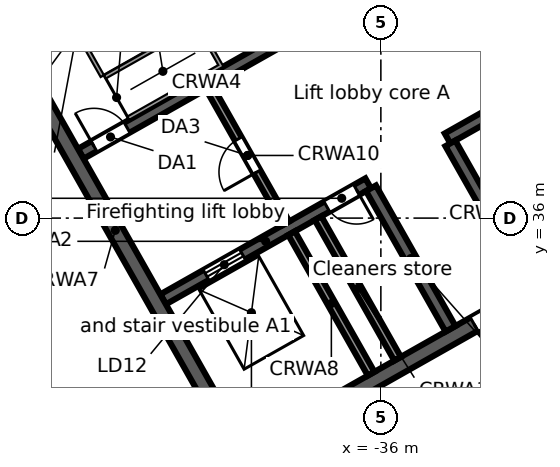
"""IFC4 building model, lengths in metres.
Left out: names, types, materials, properties, quantities, classifications, styles, units other than length and angle.
Written with IfcOpenShell. Run it as: python <this file> out.ifc"""

import sys

from ifc_helpers import new_model, si_unit, direction, frame, frame_2d, origin, place, context, subcontext, project, spatial, rectangle, extrude, element, fill, save


model = new_model("IFC4")
c1 = context("Model", 3, precision=1e-05, world=origin(), true_north=direction((0.0, 1.0)))
c2 = subcontext(c1, "Body", "Model", "MODEL_VIEW")
j1 = project(units=[si_unit("LENGTHUNIT", "METRE"), si_unit("PLANEANGLEUNIT", "RADIAN")], contexts=[c1])
p1 = place(None, origin())
s1 = spatial("IfcSite", under=j1, at=p1, CompositionType="ELEMENT")
p2 = place(p1, origin())
s2 = spatial("IfcBuilding", under=s1, at=p2, CompositionType="ELEMENT")
p3 = place(p2, frame((0.0, 0.0, 266.5)))
s3 = spatial("IfcBuildingStorey", under=s2, at=p3, CompositionType="ELEMENT", Elevation=266.5)
p4 = place(p3, frame((-58.732, 38.771, 0.0), z_axis=(0.0, 0.0, 1.0), x_axis=(0.870355615581, 0.492423702137, 0.0)))
e1 = element("IfcWall", 1, at=p4, inside=s3, PredefinedType="STANDARD", context=c2, shape_type="SweptSolid", body=[
    extrude(rectangle(XDim=64.052, YDim=0.25, at=frame_2d((32.026, 0.0))), origin(), (0.0, 0.0, 1.0), 3.52),
])
p5 = place(p4, frame((61.259, 0.0, 0.8)))
e2 = element("IfcOpeningElement", 2, at=p5, cuts=e1, PredefinedType="OPENING", context=c2, shape_type="SweptSolid", body=[
    extrude(rectangle(XDim=2.4, YDim=2.2, at=frame_2d((1.2, 1.1))), frame((0.0, 0.135, 0.0), z_axis=(0.0, -1.0, 0.0), x_axis=(1.0, 0.0, 0.0)), (0.0, 0.0, 1.0), 0.27),
])
p6 = place(p4, frame((58.216, 0.0, 0.8)))
e3 = element("IfcOpeningElement", 3, at=p6, cuts=e1, PredefinedType="OPENING", context=c2, shape_type="SweptSolid", body=[
    extrude(rectangle(XDim=2.4, YDim=2.2, at=frame_2d((1.2, 1.1))), frame((0.0, 0.135, 0.0), z_axis=(0.0, -1.0, 0.0), x_axis=(1.0, 0.0, 0.0)), (0.0, 0.0, 1.0), 0.27),
])
p7 = place(p4, frame((55.173, 0.0, 0.8)))
e4 = element("IfcOpeningElement", 4, at=p7, cuts=e1, PredefinedType="OPENING", context=c2, shape_type="SweptSolid", body=[
    extrude(rectangle(XDim=2.4, YDim=2.2, at=frame_2d((1.2, 1.1))), frame((0.0, 0.135, 0.0), z_axis=(0.0, -1.0, 0.0), x_axis=(1.0, 0.0, 0.0)), (0.0, 0.0, 1.0), 0.27),
])
p8 = place(p4, frame((52.129, 0.0, 0.8)))
e5 = element("IfcOpeningElement", 5, at=p8, cuts=e1, PredefinedType="OPENING", context=c2, shape_type="SweptSolid", body=[
    extrude(rectangle(XDim=2.4, YDim=2.2, at=frame_2d((1.2, 1.1))), frame((0.0, 0.135, 0.0), z_axis=(0.0, -1.0, 0.0), x_axis=(1.0, 0.0, 0.0)), (0.0, 0.0, 1.0), 0.27),
])
p9 = place(p4, frame((49.086, 0.0, 0.8)))
e6 = element("IfcOpeningElement", 6, at=p9, cuts=e1, PredefinedType="OPENING", context=c2, shape_type="SweptSolid", body=[
    extrude(rectangle(XDim=2.4, YDim=2.2, at=frame_2d((1.2, 1.1))), frame((0.0, 0.135, 0.0), z_axis=(0.0, -1.0, 0.0), x_axis=(1.0, 0.0, 0.0)), (0.0, 0.0, 1.0), 0.27),
])
p10 = place(p4, frame((46.043, 0.0, 0.8)))
e7 = element("IfcOpeningElement", 7, at=p10, cuts=e1, PredefinedType="OPENING", context=c2, shape_type="SweptSolid", body=[
    extrude(rectangle(XDim=2.4, YDim=2.2, at=frame_2d((1.2, 1.1))), frame((0.0, 0.135, 0.0), z_axis=(0.0, -1.0, 0.0), x_axis=(1.0, 0.0, 0.0)), (0.0, 0.0, 1.0), 0.27),
])
p11 = place(p4, frame((43.0, 0.0, 0.8)))
e8 = element("IfcOpeningElement", 8, at=p11, cuts=e1, PredefinedType="OPENING", context=c2, shape_type="SweptSolid", body=[
    extrude(rectangle(XDim=2.4, YDim=2.2, at=frame_2d((1.2, 1.1))), frame((0.0, 0.135, 0.0), z_axis=(0.0, -1.0, 0.0), x_axis=(1.0, 0.0, 0.0)), (0.0, 0.0, 1.0), 0.27),
])
p12 = place(p4, frame((39.956, 0.0, 0.8)))
e9 = element("IfcOpeningElement", 9, at=p12, cuts=e1, PredefinedType="OPENING", context=c2, shape_type="SweptSolid", body=[
    extrude(rectangle(XDim=2.4, YDim=2.2, at=frame_2d((1.2, 1.1))), frame((0.0, 0.135, 0.0), z_axis=(0.0, -1.0, 0.0), x_axis=(1.0, 0.0, 0.0)), (0.0, 0.0, 1.0), 0.27),
])
p13 = place(p4, frame((36.913, 0.0, 0.8)))
e10 = element("IfcOpeningElement", 10, at=p13, cuts=e1, PredefinedType="OPENING", context=c2, shape_type="SweptSolid", body=[
    extrude(rectangle(XDim=2.4, YDim=2.2, at=frame_2d((1.2, 1.1))), frame((0.0, 0.135, 0.0), z_axis=(0.0, -1.0, 0.0), x_axis=(1.0, 0.0, 0.0)), (0.0, 0.0, 1.0), 0.27),
])
p14 = place(p4, frame((33.87, 0.0, 0.8)))
e11 = element("IfcOpeningElement", 11, at=p14, cuts=e1, PredefinedType="OPENING", context=c2, shape_type="SweptSolid", body=[
    extrude(rectangle(XDim=2.4, YDim=2.2, at=frame_2d((1.2, 1.1))), frame((0.0, 0.135, 0.0), z_axis=(0.0, -1.0, 0.0), x_axis=(1.0, 0.0, 0.0)), (0.0, 0.0, 1.0), 0.27),
])
p15 = place(p4, frame((30.826, 0.0, 0.8)))
e12 = element("IfcOpeningElement", 12, at=p15, cuts=e1, PredefinedType="OPENING", context=c2, shape_type="SweptSolid", body=[
    extrude(rectangle(XDim=2.4, YDim=2.2, at=frame_2d((1.2, 1.1))), frame((0.0, 0.135, 0.0), z_axis=(0.0, -1.0, 0.0), x_axis=(1.0, 0.0, 0.0)), (0.0, 0.0, 1.0), 0.27),
])
p16 = place(p4, frame((27.783, 0.0, 0.8)))
e13 = element("IfcOpeningElement", 13, at=p16, cuts=e1, PredefinedType="OPENING", context=c2, shape_type="SweptSolid", body=[
    extrude(rectangle(XDim=2.4, YDim=2.2, at=frame_2d((1.2, 1.1))), frame((0.0, 0.135, 0.0), z_axis=(0.0, -1.0, 0.0), x_axis=(1.0, 0.0, 0.0)), (0.0, 0.0, 1.0), 0.27),
])
p17 = place(p4, frame((24.74, 0.0, 0.8)))
e14 = element("IfcOpeningElement", 14, at=p17, cuts=e1, PredefinedType="OPENING", context=c2, shape_type="SweptSolid", body=[
    extrude(rectangle(XDim=2.4, YDim=2.2, at=frame_2d((1.2, 1.1))), frame((0.0, 0.135, 0.0), z_axis=(0.0, -1.0, 0.0), x_axis=(1.0, 0.0, 0.0)), (0.0, 0.0, 1.0), 0.27),
])
p18 = place(p4, frame((21.696, 0.0, 0.8)))
e15 = element("IfcOpeningElement", 15, at=p18, cuts=e1, PredefinedType="OPENING", context=c2, shape_type="SweptSolid", body=[
    extrude(rectangle(XDim=2.4, YDim=2.2, at=frame_2d((1.2, 1.1))), frame((0.0, 0.135, 0.0), z_axis=(0.0, -1.0, 0.0), x_axis=(1.0, 0.0, 0.0)), (0.0, 0.0, 1.0), 0.27),
])
p19 = place(p4, frame((18.653, 0.0, 0.8)))
e16 = element("IfcOpeningElement", 16, at=p19, cuts=e1, PredefinedType="OPENING", context=c2, shape_type="SweptSolid", body=[
    extrude(rectangle(XDim=2.4, YDim=2.2, at=frame_2d((1.2, 1.1))), frame((0.0, 0.135, 0.0), z_axis=(0.0, -1.0, 0.0), x_axis=(1.0, 0.0, 0.0)), (0.0, 0.0, 1.0), 0.27),
])
p20 = place(p4, frame((15.61, 0.0, 0.8)))
e17 = element("IfcOpeningElement", 17, at=p20, cuts=e1, PredefinedType="OPENING", context=c2, shape_type="SweptSolid", body=[
    extrude(rectangle(XDim=2.4, YDim=2.2, at=frame_2d((1.2, 1.1))), frame((0.0, 0.135, 0.0), z_axis=(0.0, -1.0, 0.0), x_axis=(1.0, 0.0, 0.0)), (0.0, 0.0, 1.0), 0.27),
])
p21 = place(p4, frame((12.567, 0.0, 0.8)))
e18 = element("IfcOpeningElement", 18, at=p21, cuts=e1, PredefinedType="OPENING", context=c2, shape_type="SweptSolid", body=[
    extrude(rectangle(XDim=2.4, YDim=2.2, at=frame_2d((1.2, 1.1))), frame((0.0, 0.135, 0.0), z_axis=(0.0, -1.0, 0.0), x_axis=(1.0, 0.0, 0.0)), (0.0, 0.0, 1.0), 0.27),
])
p22 = place(p4, frame((9.523, 0.0, 0.8)))
e19 = element("IfcOpeningElement", 19, at=p22, cuts=e1, PredefinedType="OPENING", context=c2, shape_type="SweptSolid", body=[
    extrude(rectangle(XDim=2.4, YDim=2.2, at=frame_2d((1.2, 1.1))), frame((0.0, 0.135, 0.0), z_axis=(0.0, -1.0, 0.0), x_axis=(1.0, 0.0, 0.0)), (0.0, 0.0, 1.0), 0.27),
])
p23 = place(p4, frame((6.48, 0.0, 0.8)))
e20 = element("IfcOpeningElement", 20, at=p23, cuts=e1, PredefinedType="OPENING", context=c2, shape_type="SweptSolid", body=[
    extrude(rectangle(XDim=2.4, YDim=2.2, at=frame_2d((1.2, 1.1))), frame((0.0, 0.135, 0.0), z_axis=(0.0, -1.0, 0.0), x_axis=(1.0, 0.0, 0.0)), (0.0, 0.0, 1.0), 0.27),
])
p24 = place(p4, frame((3.437, 0.0, 0.8)))
e21 = element("IfcOpeningElement", 21, at=p24, cuts=e1, PredefinedType="OPENING", context=c2, shape_type="SweptSolid", body=[
    extrude(rectangle(XDim=2.4, YDim=2.2, at=frame_2d((1.2, 1.1))), frame((0.0, 0.135, 0.0), z_axis=(0.0, -1.0, 0.0), x_axis=(1.0, 0.0, 0.0)), (0.0, 0.0, 1.0), 0.27),
])
p25 = place(p4, frame((0.393, 0.0, 0.8)))
e22 = element("IfcOpeningElement", 22, at=p25, cuts=e1, PredefinedType="OPENING", context=c2, shape_type="SweptSolid", body=[
    extrude(rectangle(XDim=2.4, YDim=2.2, at=frame_2d((1.2, 1.1))), frame((0.0, 0.135, 0.0), z_axis=(0.0, -1.0, 0.0), x_axis=(1.0, 0.0, 0.0)), (0.0, 0.0, 1.0), 0.27),
])
p26 = place(p3, frame((-44.115, 26.507, 0.0), z_axis=(0.0, 0.0, 1.0), x_axis=(-0.857166583633, 0.515039268311, 0.0)))
e23 = element("IfcWall", 23, at=p26, inside=s3, PredefinedType="STANDARD", context=c2, shape_type="SweptSolid", body=[
    extrude(rectangle(XDim=17.106, YDim=0.25, at=frame_2d((8.553, 0.0))), origin(), (0.0, 0.0, 1.0), 3.52),
])
p27 = place(p26, frame((14.417, 0.0, 0.8)))
e24 = element("IfcOpeningElement", 24, at=p27, cuts=e23, PredefinedType="OPENING", context=c2, shape_type="SweptSolid", body=[
    extrude(rectangle(XDim=2.4, YDim=2.2, at=frame_2d((1.2, 1.1))), frame((0.0, 0.135, 0.0), z_axis=(0.0, -1.0, 0.0), x_axis=(1.0, 0.0, 0.0)), (0.0, 0.0, 1.0), 0.27),
])
p28 = place(p26, frame((11.584, 0.0, 0.8)))
e25 = element("IfcOpeningElement", 25, at=p28, cuts=e23, PredefinedType="OPENING", context=c2, shape_type="SweptSolid", body=[
    extrude(rectangle(XDim=2.4, YDim=2.2, at=frame_2d((1.2, 1.1))), frame((0.0, 0.135, 0.0), z_axis=(0.0, -1.0, 0.0), x_axis=(1.0, 0.0, 0.0)), (0.0, 0.0, 1.0), 0.27),
])
p29 = place(p26, frame((8.75, 0.0, 0.8)))
e26 = element("IfcOpeningElement", 26, at=p29, cuts=e23, PredefinedType="OPENING", context=c2, shape_type="SweptSolid", body=[
    extrude(rectangle(XDim=2.4, YDim=2.2, at=frame_2d((1.2, 1.1))), frame((0.0, 0.135, 0.0), z_axis=(0.0, -1.0, 0.0), x_axis=(1.0, 0.0, 0.0)), (0.0, 0.0, 1.0), 0.27),
])
p30 = place(p26, frame((5.917, 0.0, 0.8)))
e27 = element("IfcOpeningElement", 27, at=p30, cuts=e23, PredefinedType="OPENING", context=c2, shape_type="SweptSolid", body=[
    extrude(rectangle(XDim=2.4, YDim=2.2, at=frame_2d((1.2, 1.1))), frame((0.0, 0.135, 0.0), z_axis=(0.0, -1.0, 0.0), x_axis=(1.0, 0.0, 0.0)), (0.0, 0.0, 1.0), 0.27),
])
p31 = place(p26, frame((3.084, 0.0, 0.8)))
e28 = element("IfcOpeningElement", 28, at=p31, cuts=e23, PredefinedType="OPENING", context=c2, shape_type="SweptSolid", body=[
    extrude(rectangle(XDim=2.4, YDim=2.2, at=frame_2d((1.2, 1.1))), frame((0.0, 0.135, 0.0), z_axis=(0.0, -1.0, 0.0), x_axis=(1.0, 0.0, 0.0)), (0.0, 0.0, 1.0), 0.27),
])
p32 = place(p26, frame((0.25, 0.0, 0.8)))
e29 = element("IfcOpeningElement", 29, at=p32, cuts=e23, PredefinedType="OPENING", context=c2, shape_type="SweptSolid", body=[
    extrude(rectangle(XDim=2.4, YDim=2.2, at=frame_2d((1.2, 1.1))), frame((0.0, 0.135, 0.0), z_axis=(0.0, -1.0, 0.0), x_axis=(1.0, 0.0, 0.0)), (0.0, 0.0, 1.0), 0.27),
])
p33 = place(p3, frame((-3.017, 46.293, 0.0), z_axis=(0.0, 0.0, 1.0), x_axis=(-0.870355474887, -0.492423950812, 0.0)))
e30 = element("IfcWall", 30, at=p33, inside=s3, PredefinedType="STANDARD", context=c2, shape_type="SweptSolid", body=[
    extrude(rectangle(XDim=40.34, YDim=0.25, at=frame_2d((20.17, 0.0))), origin(), (0.0, 0.0, 1.0), 3.52),
])
p34 = place(p33, frame((37.428, 0.0, 0.8)))
e31 = element("IfcOpeningElement", 31, at=p34, cuts=e30, PredefinedType="OPENING", context=c2, shape_type="SweptSolid", body=[
    extrude(rectangle(XDim=2.4, YDim=2.2, at=frame_2d((1.2, 1.1))), frame((0.0, 0.135, 0.0), z_axis=(0.0, -1.0, 0.0), x_axis=(1.0, 0.0, 0.0)), (0.0, 0.0, 1.0), 0.27),
])
p35 = place(p33, frame((34.372, 0.0, 0.0)))
e32 = element("IfcOpeningElement", 32, at=p35, cuts=e30, PredefinedType="OPENING", context=c2, shape_type="SweptSolid", body=[
    extrude(rectangle(XDim=1.8, YDim=2.4, at=frame_2d((0.9, 1.2))), frame((0.0, 0.135, 0.0), z_axis=(0.0, -1.0, 0.0), x_axis=(1.0, 0.0, 0.0)), (0.0, 0.0, 1.0), 0.27),
])
p36 = place(p33, frame((30.716, 0.0, 0.8)))
e33 = element("IfcOpeningElement", 33, at=p36, cuts=e30, PredefinedType="OPENING", context=c2, shape_type="SweptSolid", body=[
    extrude(rectangle(XDim=2.4, YDim=2.2, at=frame_2d((1.2, 1.1))), frame((0.0, 0.135, 0.0), z_axis=(0.0, -1.0, 0.0), x_axis=(1.0, 0.0, 0.0)), (0.0, 0.0, 1.0), 0.27),
])
p37 = place(p33, frame((27.36, 0.0, 0.8)))
e34 = element("IfcOpeningElement", 34, at=p37, cuts=e30, PredefinedType="OPENING", context=c2, shape_type="SweptSolid", body=[
    extrude(rectangle(XDim=2.4, YDim=2.2, at=frame_2d((1.2, 1.1))), frame((0.0, 0.135, 0.0), z_axis=(0.0, -1.0, 0.0), x_axis=(1.0, 0.0, 0.0)), (0.0, 0.0, 1.0), 0.27),
])
p38 = place(p33, frame((24.304, 0.0, 0.0)))
e35 = element("IfcOpeningElement", 35, at=p38, cuts=e30, PredefinedType="OPENING", context=c2, shape_type="SweptSolid", body=[
    extrude(rectangle(XDim=1.8, YDim=2.4, at=frame_2d((0.9, 1.2))), frame((0.0, 0.135, 0.0), z_axis=(0.0, -1.0, 0.0), x_axis=(1.0, 0.0, 0.0)), (0.0, 0.0, 1.0), 0.27),
])
p39 = place(p33, frame((20.648, 0.0, 0.8)))
e36 = element("IfcOpeningElement", 36, at=p39, cuts=e30, PredefinedType="OPENING", context=c2, shape_type="SweptSolid", body=[
    extrude(rectangle(XDim=2.4, YDim=2.2, at=frame_2d((1.2, 1.1))), frame((0.0, 0.135, 0.0), z_axis=(0.0, -1.0, 0.0), x_axis=(1.0, 0.0, 0.0)), (0.0, 0.0, 1.0), 0.27),
])
p40 = place(p33, frame((17.292, 0.0, 0.8)))
e37 = element("IfcOpeningElement", 37, at=p40, cuts=e30, PredefinedType="OPENING", context=c2, shape_type="SweptSolid", body=[
    extrude(rectangle(XDim=2.4, YDim=2.2, at=frame_2d((1.2, 1.1))), frame((0.0, 0.135, 0.0), z_axis=(0.0, -1.0, 0.0), x_axis=(1.0, 0.0, 0.0)), (0.0, 0.0, 1.0), 0.27),
])
p41 = place(p33, frame((14.236, 0.0, 0.0)))
e38 = element("IfcOpeningElement", 38, at=p41, cuts=e30, PredefinedType="OPENING", context=c2, shape_type="SweptSolid", body=[
    extrude(rectangle(XDim=1.8, YDim=2.4, at=frame_2d((0.9, 1.2))), frame((0.0, 0.135, 0.0), z_axis=(0.0, -1.0, 0.0), x_axis=(1.0, 0.0, 0.0)), (0.0, 0.0, 1.0), 0.27),
])
p42 = place(p33, frame((10.58, 0.0, 0.8)))
e39 = element("IfcOpeningElement", 39, at=p42, cuts=e30, PredefinedType="OPENING", context=c2, shape_type="SweptSolid", body=[
    extrude(rectangle(XDim=2.4, YDim=2.2, at=frame_2d((1.2, 1.1))), frame((0.0, 0.135, 0.0), z_axis=(0.0, -1.0, 0.0), x_axis=(1.0, 0.0, 0.0)), (0.0, 0.0, 1.0), 0.27),
])
p43 = place(p33, frame((7.224, 0.0, 0.8)))
e40 = element("IfcOpeningElement", 40, at=p43, cuts=e30, PredefinedType="OPENING", context=c2, shape_type="SweptSolid", body=[
    extrude(rectangle(XDim=2.4, YDim=2.2, at=frame_2d((1.2, 1.1))), frame((0.0, 0.135, 0.0), z_axis=(0.0, -1.0, 0.0), x_axis=(1.0, 0.0, 0.0)), (0.0, 0.0, 1.0), 0.27),
])
p44 = place(p33, frame((4.168, 0.0, 0.0)))
e41 = element("IfcOpeningElement", 41, at=p44, cuts=e30, PredefinedType="OPENING", context=c2, shape_type="SweptSolid", body=[
    extrude(rectangle(XDim=1.8, YDim=2.4, at=frame_2d((0.9, 1.2))), frame((0.0, 0.135, 0.0), z_axis=(0.0, -1.0, 0.0), x_axis=(1.0, 0.0, 0.0)), (0.0, 0.0, 1.0), 0.27),
])
p45 = place(p33, frame((0.512, 0.0, 0.8)))
e42 = element("IfcOpeningElement", 42, at=p45, cuts=e30, PredefinedType="OPENING", context=c2, shape_type="SweptSolid", body=[
    extrude(rectangle(XDim=2.4, YDim=2.2, at=frame_2d((1.2, 1.1))), frame((0.0, 0.135, 0.0), z_axis=(0.0, -1.0, 0.0), x_axis=(1.0, 0.0, 0.0)), (0.0, 0.0, 1.0), 0.27),
])
p46 = place(p3, frame((-39.813, 29.662, 0.0), z_axis=(0.0, 0.0, 1.0), x_axis=(0.870350116061, 0.492433422375, 0.0)))
e43 = element("IfcWall", 43, at=p46, inside=s3, PredefinedType="SOLIDWALL", context=c2, shape_type="SweptSolid", body=[
    extrude(rectangle(XDim=17.0, YDim=0.4, at=frame_2d((8.5, 0.0))), origin(), (0.0, 0.0, 1.0), 3.52),
])
p47 = place(p46, frame((7.2, 0.0, 0.0)))
e44 = element("IfcOpeningElement", 44, at=p47, cuts=e43, PredefinedType="OPENING", context=c2, shape_type="SweptSolid", body=[
    extrude(rectangle(XDim=1.2, YDim=2.1, at=frame_2d((0.6, 1.05))), frame((0.0, 0.21, 0.0), z_axis=(0.0, -1.0, 0.0), x_axis=(1.0, 0.0, 0.0)), (0.0, 0.0, 1.0), 0.42),
])
p48 = place(p3, frame((-41.73, 33.863, 0.0), z_axis=(0.0, 0.0, 1.0), x_axis=(0.870350800578, 0.492432212525, 0.0)))
e45 = element("IfcWall", 45, at=p48, inside=s3, PredefinedType="SOLIDWALL", context=c2, shape_type="SweptSolid", body=[
    extrude(rectangle(XDim=6.2, YDim=0.3, at=frame_2d((3.1, 0.0))), origin(), (0.0, 0.0, 1.0), 3.52),
])
p49 = place(p48, frame((1.3, 0.0, 0.0)))
e46 = element("IfcOpeningElement", 46, at=p49, cuts=e45, PredefinedType="OPENING", context=c2, shape_type="SweptSolid", body=[
    extrude(rectangle(XDim=1.1, YDim=2.1, at=frame_2d((0.55, 1.05))), frame((0.0, 0.16, 0.0), z_axis=(0.0, -1.0, 0.0), x_axis=(1.0, 0.0, 0.0)), (0.0, 0.0, 1.0), 0.32),
])
p50 = place(p48, frame((4.95, 0.0, 0.0)))
e47 = element("IfcOpeningElement", 47, at=p50, cuts=e45, PredefinedType="OPENING", context=c2, shape_type="SweptSolid", body=[
    extrude(rectangle(XDim=0.9, YDim=2.1, at=frame_2d((0.45, 1.05))), frame((0.0, 0.16, 0.0), z_axis=(0.0, -1.0, 0.0), x_axis=(1.0, 0.0, 0.0)), (0.0, 0.0, 1.0), 0.32),
])
p51 = place(p3, frame((-34.245, 38.097, 0.0), z_axis=(0.0, 0.0, 1.0), x_axis=(0.870356351998, 0.492422400523, 0.0)))
e48 = element("IfcWall", 48, at=p51, inside=s3, PredefinedType="SOLIDWALL", context=c2, shape_type="SweptSolid", body=[
    extrude(rectangle(XDim=7.6, YDim=0.3, at=frame_2d((3.8, 0.0))), origin(), (0.0, 0.0, 1.0), 3.52),
])
p52 = place(p51, frame((6.2, 0.0, 0.0)))
e49 = element("IfcOpeningElement", 49, at=p52, cuts=e48, PredefinedType="OPENING", context=c2, shape_type="SweptSolid", body=[
    extrude(rectangle(XDim=1.0, YDim=2.1, at=frame_2d((0.5, 1.05))), frame((0.0, 0.16, 0.0), z_axis=(0.0, -1.0, 0.0), x_axis=(1.0, 0.0, 0.0)), (0.0, 0.0, 1.0), 0.32),
])
p53 = place(p3, frame((-43.897, 37.692, 0.0), z_axis=(0.0, 0.0, 1.0), x_axis=(0.870356351998, 0.492422400523, 0.0)))
e50 = element("IfcWall", 50, at=p53, inside=s3, PredefinedType="SOLIDWALL", context=c2, shape_type="SweptSolid", body=[
    extrude(rectangle(XDim=7.6, YDim=0.3, at=frame_2d((3.8, 0.0))), origin(), (0.0, 0.0, 1.0), 3.52),
])
p54 = place(p53, frame((0.4, 0.0, 0.0)))
e51 = element("IfcOpeningElement", 51, at=p54, cuts=e50, PredefinedType="OPENING", context=c2, shape_type="SweptSolid", body=[
    extrude(rectangle(XDim=1.0, YDim=2.1, at=frame_2d((0.5, 1.05))), frame((0.0, 0.16, 0.0), z_axis=(0.0, -1.0, 0.0), x_axis=(1.0, 0.0, 0.0)), (0.0, 0.0, 1.0), 0.32),
])
p55 = place(p3, frame((-46.238, 41.423, 0.0), z_axis=(0.0, 0.0, 1.0), x_axis=(0.492421663121, -0.870356769198, 0.0)))
e52 = element("IfcWall", 52, at=p55, inside=s3, PredefinedType="SOLIDWALL", context=c2, shape_type="SweptSolid", body=[
    extrude(rectangle(XDim=13.2, YDim=0.4, at=frame_2d((6.6, 0.0))), origin(), (0.0, 0.0, 1.0), 3.52),
])
p56 = place(p3, frame((-38.349, 35.603, 0.0), z_axis=(0.0, 0.0, 1.0), x_axis=(0.492397924348, -0.870370199454, 0.0)))
e53 = element("IfcWall", 53, at=p56, inside=s3, PredefinedType="SOLIDWALL", context=c2, shape_type="SweptSolid", body=[
    extrude(rectangle(XDim=4.25, YDim=0.2, at=frame_2d((2.125, 0.0))), origin(), (0.0, 0.0, 1.0), 3.52),
])
p57 = place(p3, frame((-40.516, 39.433, 0.0), z_axis=(0.0, 0.0, 1.0), x_axis=(0.492453559952, -0.87033872216, 0.0)))
e54 = element("IfcWall", 54, at=p57, inside=s3, PredefinedType="PARTITIONING", context=c2, shape_type="SweptSolid", body=[
    extrude(rectangle(XDim=4.1, YDim=0.2, at=frame_2d((2.05, 0.0))), origin(), (0.0, 0.0, 1.0), 3.52),
])
p58 = place(p57, frame((1.55, 0.0, 0.0)))
e55 = element("IfcOpeningElement", 55, at=p58, cuts=e54, PredefinedType="OPENING", context=c2, shape_type="SweptSolid", body=[
    extrude(rectangle(XDim=1.0, YDim=2.1, at=frame_2d((0.5, 1.05))), frame((0.0, 0.11, 0.0), z_axis=(0.0, -1.0, 0.0), x_axis=(1.0, 0.0, 0.0)), (0.0, 0.0, 1.0), 0.22),
])
p59 = place(p3, frame((-37.653, 35.997, 0.0), z_axis=(0.0, 0.0, 1.0), x_axis=(0.492422543467, -0.870356271124, 0.0)))
e56 = element("IfcWall", 56, at=p59, inside=s3, PredefinedType="SOLIDWALL", context=c2, shape_type="SweptSolid", body=[
    extrude(rectangle(XDim=4.25, YDim=0.2, at=frame_2d((2.125, 0.0))), origin(), (0.0, 0.0, 1.0), 3.52),
])
for number, where, z_axis, x_axis in (
    (57, (-36.26, 36.785, 0.0), (0.0, 0.0, 1.0), (0.492, -0.87, 0.0)),
    (58, (-34.171, 37.967, 0.0), (0.0, 0.0, 1.0), (0.492, -0.87, 0.0)),
):
    element("IfcWall", number, at=place(p3, frame(where, z_axis=z_axis, x_axis=x_axis)), inside=s3, PredefinedType="SOLIDWALL", context=c2, shape_type="SweptSolid", body=[
        extrude(rectangle(XDim=4.25, YDim=0.3, at=frame_2d((2.125, 0.0))), origin(), (0.0, 0.0, 1.0), 3.52),
    ])
p60 = place(p49, origin())
e59 = element("IfcDoor", 59, at=p60, inside=s3, OperationType="DOUBLE_DOOR_SLIDING", PredefinedType="DOOR", context=c2, shape_type="SweptSolid", body=[
    extrude(rectangle(XDim=1.1, YDim=2.1, at=frame_2d((0.55, 1.05))), frame((0.0, 0.025, 0.0), z_axis=(0.0, -1.0, 0.0), x_axis=(1.0, 0.0, 0.0)), (0.0, 0.0, 1.0), 0.05),
])
fill(e46, e59)
p61 = place(p54, origin())
e60 = element("IfcDoor", 60, at=p61, inside=s3, OperationType="SINGLE_SWING_LEFT", PredefinedType="DOOR", context=c2, shape_type="SweptSolid", body=[
    extrude(rectangle(XDim=1.0, YDim=2.1, at=frame_2d((0.5, 1.05))), frame((0.0, 0.025, 0.0), z_axis=(0.0, -1.0, 0.0), x_axis=(1.0, 0.0, 0.0)), (0.0, 0.0, 1.0), 0.05),
])
fill(e51, e60)
p62 = place(p58, frame((1.0, 0.0, 0.0), z_axis=(0.0, 0.0, 1.0), x_axis=(-1.0, 0.0, 0.0)))
e61 = element("IfcDoor", 61, at=p62, inside=s3, OperationType="SINGLE_SWING_LEFT", PredefinedType="DOOR", context=c2, shape_type="SweptSolid", body=[
    extrude(rectangle(XDim=1.0, YDim=2.1, at=frame_2d((0.5, 1.05))), frame((0.0, 0.025, 0.0), z_axis=(0.0, -1.0, 0.0), x_axis=(1.0, 0.0, 0.0)), (0.0, 0.0, 1.0), 0.05),
])
fill(e55, e61)
p63 = place(p47, frame((1.2, 0.0, 0.0), z_axis=(0.0, 0.0, 1.0), x_axis=(-1.0, 0.0, 0.0)))
e62 = element("IfcDoor", 62, at=p63, inside=s3, OperationType="SINGLE_SWING_RIGHT", PredefinedType="DOOR", context=c2, shape_type="SweptSolid", body=[
    extrude(rectangle(XDim=1.2, YDim=2.1, at=frame_2d((0.6, 1.05))), frame((0.0, 0.025, 0.0), z_axis=(0.0, -1.0, 0.0), x_axis=(1.0, 0.0, 0.0)), (0.0, 0.0, 1.0), 0.05),
])
fill(e44, e62)
p64 = place(p50, frame((0.9, 0.0, 0.0), z_axis=(0.0, 0.0, 1.0), x_axis=(-1.0, 0.0, 0.0)))
e63 = element("IfcDoor", 63, at=p64, inside=s3, OperationType="SINGLE_SWING_LEFT", PredefinedType="DOOR", context=c2, shape_type="SweptSolid", body=[
    extrude(rectangle(XDim=0.9, YDim=2.1, at=frame_2d((0.45, 1.05))), frame((0.0, 0.025, 0.0), z_axis=(0.0, -1.0, 0.0), x_axis=(1.0, 0.0, 0.0)), (0.0, 0.0, 1.0), 0.05),
])
fill(e47, e63)
save(model, sys.argv[1])
